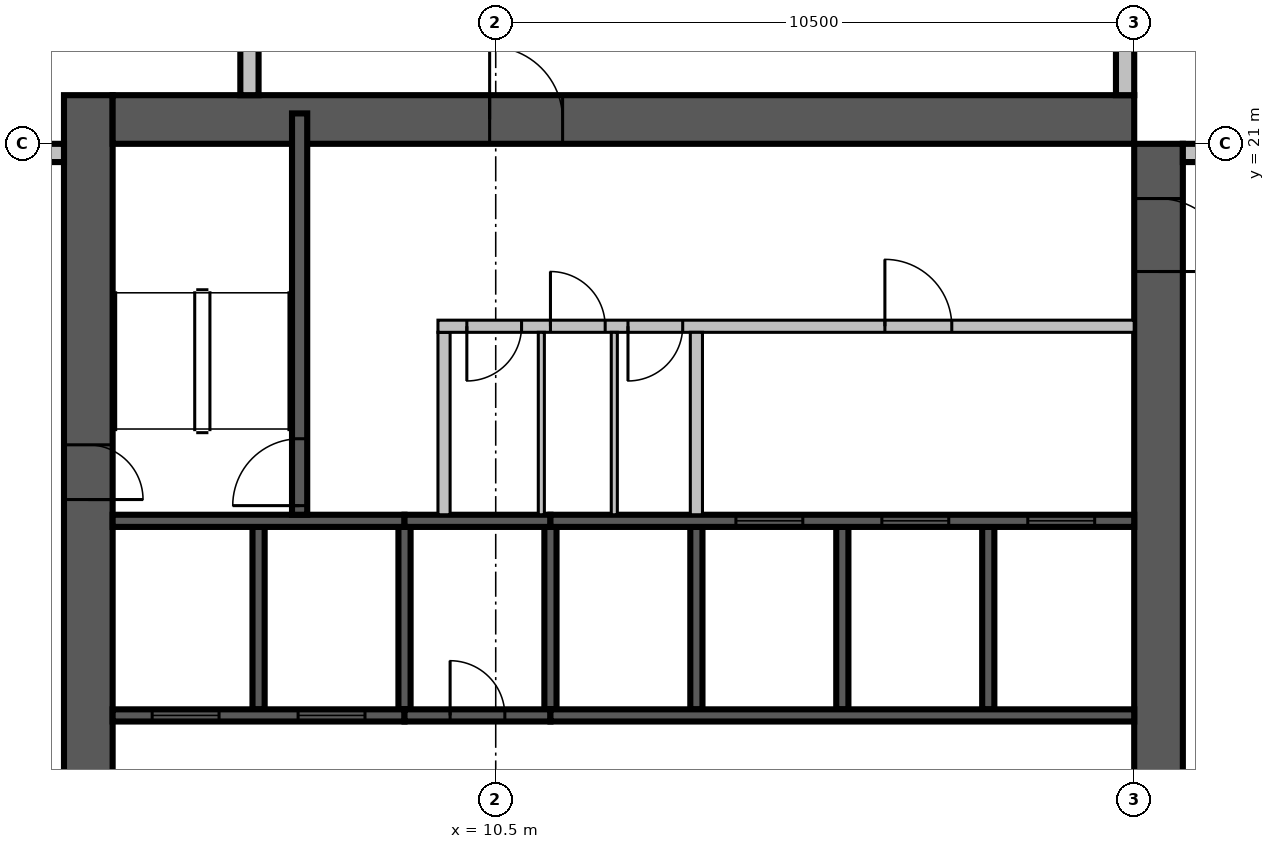
"""IFC4 building model, lengths in metres.
Left out: names, types, materials, properties, quantities, classifications, styles, units other than length and angle.
Written with IfcOpenShell. Run it as: python <this file> out.ifc"""

import sys

from ifc_helpers import new_model, si_unit, direction, frame, frame_2d, origin, place, context, subcontext, project, spatial, rectangle, extrude, source, transform, mapped, element, fill, save


model = new_model("IFC4")
c1 = context("Model", 3, precision=1e-05, world=origin(), true_north=direction((0.0, 1.0)))
c2 = subcontext(c1, "Body", "Model", "MODEL_VIEW")
j1 = project(units=[si_unit("LENGTHUNIT", "METRE"), si_unit("PLANEANGLEUNIT", "RADIAN")], contexts=[c1])
p1 = place(None, origin())
s1 = spatial("IfcSite", under=j1, at=p1, CompositionType="ELEMENT")
p2 = place(p1, origin())
s2 = spatial("IfcBuilding", under=s1, at=p2, CompositionType="ELEMENT")
p3 = place(p2, frame((0.0, 0.0, 196.8)))
s3 = spatial("IfcBuildingStorey", under=s2, at=p3, CompositionType="ELEMENT", Elevation=196.8)
m1 = source(origin(), c2, "Body", "SweptSolid", [
    extrude(rectangle(XDim=17.6, YDim=0.8, at=frame_2d((8.8, 0.0))), origin(), (0.0, 0.0, 1.0), 3.8),
])
p4 = place(p3, frame((3.8, 4.2, 0.0), z_axis=(0.0, 0.0, 1.0), x_axis=(0.0, 1.0, 0.0)))
e1 = element("IfcWall", 1, at=p4, inside=s3, PredefinedType="SHEAR", context=c2, shape_type="MappedRepresentation", body=[
    mapped(m1, transform((0.0, 0.0, 0.0), scale=1.0)),
])
m2 = source(origin(), c2, "Body", "SweptSolid", [
    extrude(rectangle(XDim=2.2, YDim=2.1, at=frame_2d((1.1, 1.05))), frame((0.0, 0.41, 0.0), z_axis=(0.0, -1.0, 0.0), x_axis=(1.0, 0.0, 0.0)), (0.0, 0.0, 1.0), 0.82),
])
p5 = place(p4, frame((4.2, 0.0, 0.0)))
e2 = element("IfcOpeningElement", 2, at=p5, cuts=e1, PredefinedType="OPENING", context=c2, shape_type="MappedRepresentation", body=[
    mapped(m2, transform((0.0, 0.0, 0.0), scale=1.0)),
])
m3 = source(origin(), c2, "Body", "SweptSolid", [
    extrude(rectangle(XDim=0.9, YDim=2.1, at=frame_2d((0.45, 1.05))), frame((0.0, 0.41, 0.0), z_axis=(0.0, -1.0, 0.0), x_axis=(1.0, 0.0, 0.0)), (0.0, 0.0, 1.0), 0.82),
])
p6 = place(p4, frame((10.95, 0.0, 0.0)))
e3 = element("IfcOpeningElement", 3, at=p6, cuts=e1, PredefinedType="OPENING", context=c2, shape_type="MappedRepresentation", body=[
    mapped(m3, transform((0.0, 0.0, 0.0), scale=1.0)),
])
m4 = source(origin(), c2, "Body", "SweptSolid", [
    extrude(rectangle(XDim=16.8, YDim=0.8, at=frame_2d((8.4, 0.0))), origin(), (0.0, 0.0, 1.0), 3.8),
])
p7 = place(p3, frame((21.4, 4.2, 0.0), z_axis=(0.0, 0.0, 1.0), x_axis=(0.0, 1.0, 0.0)))
e4 = element("IfcWall", 4, at=p7, inside=s3, PredefinedType="SHEAR", context=c2, shape_type="MappedRepresentation", body=[
    mapped(m4, transform((0.0, 0.0, 0.0), scale=1.0)),
])
p8 = place(p7, frame((4.2, 0.0, 0.0)))
e5 = element("IfcOpeningElement", 5, at=p8, cuts=e4, PredefinedType="OPENING", context=c2, shape_type="MappedRepresentation", body=[
    mapped(m2, transform((0.0, 0.0, 0.0), scale=1.0)),
])
m5 = source(origin(), c2, "Body", "SweptSolid", [
    extrude(rectangle(XDim=1.2, YDim=2.1, at=frame_2d((0.6, 1.05))), frame((0.0, 0.41, 0.0), z_axis=(0.0, -1.0, 0.0), x_axis=(1.0, 0.0, 0.0)), (0.0, 0.0, 1.0), 0.82),
])
p9 = place(p7, frame((14.7, 0.0, 0.0)))
e6 = element("IfcOpeningElement", 6, at=p9, cuts=e4, PredefinedType="OPENING", context=c2, shape_type="MappedRepresentation", body=[
    mapped(m5, transform((0.0, 0.0, 0.0), scale=1.0)),
])
p10 = place(p3, frame((4.2, 21.4, 0.0), z_axis=(0.0, 0.0, 1.0), x_axis=(1.0, 0.0, 0.0)))
e7 = element("IfcWall", 7, at=p10, inside=s3, PredefinedType="SHEAR", context=c2, shape_type="MappedRepresentation", body=[
    mapped(m4, transform((0.0, 0.0, 0.0), scale=1.0)),
])
p11 = place(p10, frame((6.2, 0.0, 0.0)))
e8 = element("IfcOpeningElement", 8, at=p11, cuts=e7, PredefinedType="OPENING", context=c2, shape_type="MappedRepresentation", body=[
    mapped(m5, transform((0.0, 0.0, 0.0), scale=1.0)),
])
m6 = source(origin(), c2, "Body", "SweptSolid", [
    extrude(rectangle(XDim=7.15, YDim=0.3, at=frame_2d((3.575, 0.0))), origin(), (0.0, 0.0, 1.0), 3.4),
])
p12 = place(p3, frame((28.95, 20.85, 0.0), z_axis=(0.0, 0.0, 1.0), x_axis=(-1.0, 0.0, 0.0)))
e9 = element("IfcWall", 9, at=p12, inside=s3, PredefinedType="STANDARD", context=c2, shape_type="MappedRepresentation", body=[
    mapped(m6, transform((0.0, 0.0, 0.0), scale=1.0)),
])
m7 = source(origin(), c2, "Body", "SweptSolid", [
    extrude(rectangle(XDim=3.0, YDim=2.3, at=frame_2d((1.5, 1.15))), frame((0.0, 0.16, 0.0), z_axis=(0.0, -1.0, 0.0), x_axis=(1.0, 0.0, 0.0)), (0.0, 0.0, 1.0), 0.32),
])
p13 = place(p12, frame((0.15, 0.0, 0.6)))
e10 = element("IfcOpeningElement", 10, at=p13, cuts=e9, PredefinedType="OPENING", context=c2, shape_type="MappedRepresentation", body=[
    mapped(m7, transform((0.0, 0.0, 0.0), scale=1.0)),
])
p14 = place(p3, frame((20.85, 21.8, 0.0), z_axis=(0.0, 0.0, 1.0), x_axis=(0.0, 1.0, 0.0)))
e11 = element("IfcWall", 11, at=p14, inside=s3, PredefinedType="STANDARD", context=c2, shape_type="MappedRepresentation", body=[
    mapped(m6, transform((0.0, 0.0, 0.0), scale=1.0)),
])
p15 = place(p14, frame((4.0, 0.0, 0.6)))
e12 = element("IfcOpeningElement", 12, at=p15, cuts=e11, PredefinedType="OPENING", context=c2, shape_type="MappedRepresentation", body=[
    mapped(m7, transform((0.0, 0.0, 0.0), scale=1.0)),
])
m8 = source(origin(), c2, "Body", "SweptSolid", [
    extrude(rectangle(XDim=16.6, YDim=0.3, at=frame_2d((8.3, 0.0))), origin(), (0.0, 0.0, 1.0), 3.4),
])
p16 = place(p3, frame((6.45, 38.4, 0.0), z_axis=(0.0, 0.0, 1.0), x_axis=(0.0, -1.0, 0.0)))
e13 = element("IfcWall", 13, at=p16, inside=s3, PredefinedType="STANDARD", context=c2, shape_type="MappedRepresentation", body=[
    mapped(m8, transform((0.0, 0.0, 0.0), scale=1.0)),
])
m9 = source(origin(), c2, "Body", "SweptSolid", [
    extrude(rectangle(XDim=1.8, YDim=2.3, at=frame_2d((0.9, 1.15))), frame((0.0, 0.16, 0.0), z_axis=(0.0, -1.0, 0.0), x_axis=(1.0, 0.0, 0.0)), (0.0, 0.0, 1.0), 0.32),
])
p17 = place(p16, frame((1.15, 0.0, 0.6)))
e14 = element("IfcOpeningElement", 14, at=p17, cuts=e13, PredefinedType="OPENING", context=c2, shape_type="MappedRepresentation", body=[
    mapped(m9, transform((0.0, 0.0, 0.0), scale=1.0)),
])
p18 = place(p16, frame((9.438, 0.0, 0.6)))
e15 = element("IfcOpeningElement", 15, at=p18, cuts=e13, PredefinedType="OPENING", context=c2, shape_type="MappedRepresentation", body=[
    mapped(m9, transform((0.0, 0.0, 0.0), scale=1.0)),
])
m10 = source(origin(), c2, "Body", "SweptSolid", [
    extrude(rectangle(XDim=1.2, YDim=2.3, at=frame_2d((0.6, 1.15))), frame((0.0, 0.16, 0.0), z_axis=(0.0, -1.0, 0.0), x_axis=(1.0, 0.0, 0.0)), (0.0, 0.0, 1.0), 0.32),
])
p19 = place(p16, frame((13.012, 0.0, 0.6)))
e16 = element("IfcOpeningElement", 16, at=p19, cuts=e13, PredefinedType="OPENING", context=c2, shape_type="MappedRepresentation", body=[
    mapped(m10, transform((0.0, 0.0, 0.0), scale=1.0)),
])
m11 = source(origin(), c2, "Body", "SweptSolid", [
    extrude(rectangle(XDim=1.0, YDim=2.1, at=frame_2d((0.5, 1.05))), frame((0.0, 0.16, 0.0), z_axis=(0.0, -1.0, 0.0), x_axis=(1.0, 0.0, 0.0)), (0.0, 0.0, 1.0), 0.32),
])
p20 = place(p16, frame((5.45, 0.0, 0.0)))
e17 = element("IfcOpeningElement", 17, at=p20, cuts=e13, PredefinedType="OPENING", context=c2, shape_type="MappedRepresentation", body=[
    mapped(m11, transform((0.0, 0.0, 0.0), scale=1.0)),
])
m12 = source(origin(), c2, "Body", "SweptSolid", [
    extrude(rectangle(XDim=2.5, YDim=0.3, at=frame_2d((1.25, 0.0))), origin(), (0.0, 0.0, 1.0), 3.4),
])
p21 = place(p3, frame((3.4, 20.85, 0.0), z_axis=(0.0, 0.0, 1.0), x_axis=(-1.0, 0.0, 0.0)))
e18 = element("IfcWall", 18, at=p21, inside=s3, PredefinedType="STANDARD", context=c2, shape_type="MappedRepresentation", body=[
    mapped(m12, transform((0.0, 0.0, 0.0), scale=1.0)),
])
p22 = place(p21, frame((0.4, 0.0, 0.6)))
e19 = element("IfcOpeningElement", 19, at=p22, cuts=e18, PredefinedType="OPENING", context=c2, shape_type="MappedRepresentation", body=[
    mapped(m9, transform((0.0, 0.0, 0.0), scale=1.0)),
])
m13 = source(origin(), c2, "Body", "SweptSolid", [
    extrude(rectangle(XDim=3.0, YDim=0.2, at=frame_2d((1.5, 0.0))), origin(), (0.0, 0.0, 1.0), 3.8),
])
p23 = place(p3, frame((6.6, 11.7, 0.0), z_axis=(0.0, 0.0, 1.0), x_axis=(0.0, 1.0, 0.0)))
e20 = element("IfcWall", 20, at=p23, inside=s3, PredefinedType="SOLIDWALL", context=c2, shape_type="MappedRepresentation", body=[
    mapped(m13, transform((0.0, 0.0, 0.0), scale=1.0)),
])
m14 = source(origin(), c2, "Body", "SweptSolid", [
    extrude(rectangle(XDim=3.0, YDim=0.2, at=frame_2d((1.5, 0.0))), origin(), (0.0, 0.0, 1.0), 3.4),
])
for number, where, z_axis, x_axis in (
    (21, (9.0, 11.7, 0.0), (0.0, 0.0, 1.0), (0.0, 1.0, 0.0)),
    (22, (11.4, 11.7, 0.0), (0.0, 0.0, 1.0), (0.0, 1.0, 0.0)),
):
    element("IfcWall", number, at=place(p3, frame(where, z_axis=z_axis, x_axis=x_axis)), inside=s3, PredefinedType="SOLIDWALL", context=c2, shape_type="MappedRepresentation", body=[
        mapped(m14, transform((0.0, 0.0, 0.0), scale=1.0)),
    ])
for number, where, z_axis, x_axis in (
    (23, (13.8, 11.7, 0.0), (0.0, 0.0, 1.0), (0.0, 1.0, 0.0)),
    (24, (16.2, 11.7, 0.0), (0.0, 0.0, 1.0), (0.0, 1.0, 0.0)),
    (25, (18.6, 11.7, 0.0), (0.0, 0.0, 1.0), (0.0, 1.0, 0.0)),
):
    element("IfcWall", number, at=place(p3, frame(where, z_axis=z_axis, x_axis=x_axis)), inside=s3, PredefinedType="SOLIDWALL", context=c2, shape_type="MappedRepresentation", body=[
        mapped(m13, transform((0.0, 0.0, 0.0), scale=1.0)),
    ])
m15 = source(origin(), c2, "Body", "SweptSolid", [
    extrude(rectangle(XDim=4.8, YDim=0.2, at=frame_2d((2.4, 0.0))), origin(), (0.0, 0.0, 1.0), 3.8),
])
p24 = place(p3, frame((4.2, 11.6, 0.0), z_axis=(0.0, 0.0, 1.0), x_axis=(1.0, 0.0, 0.0)))
e26 = element("IfcWall", 26, at=p24, inside=s3, PredefinedType="SOLIDWALL", context=c2, shape_type="MappedRepresentation", body=[
    mapped(m15, transform((0.0, 0.0, 0.0), scale=1.0)),
])
m16 = source(origin(), c2, "Body", "SweptSolid", [
    extrude(rectangle(XDim=1.1, YDim=2.1, at=frame_2d((0.55, 1.05))), frame((0.0, 0.11, 0.0), z_axis=(0.0, -1.0, 0.0), x_axis=(1.0, 0.0, 0.0)), (0.0, 0.0, 1.0), 0.22),
])
p25 = place(p24, frame((0.65, 0.0, 0.0)))
e27 = element("IfcOpeningElement", 27, at=p25, cuts=e26, PredefinedType="OPENING", context=c2, shape_type="MappedRepresentation", body=[
    mapped(m16, transform((0.0, 0.0, 0.0), scale=1.0)),
])
p26 = place(p24, frame((3.05, 0.0, 0.0)))
e28 = element("IfcOpeningElement", 28, at=p26, cuts=e26, PredefinedType="OPENING", context=c2, shape_type="MappedRepresentation", body=[
    mapped(m16, transform((0.0, 0.0, 0.0), scale=1.0)),
])
m17 = source(origin(), c2, "Body", "SweptSolid", [
    extrude(rectangle(XDim=2.4, YDim=0.2, at=frame_2d((1.2, 0.0))), origin(), (0.0, 0.0, 1.0), 3.4),
])
p27 = place(p3, frame((9.0, 11.6, 0.0), z_axis=(0.0, 0.0, 1.0), x_axis=(1.0, 0.0, 0.0)))
e29 = element("IfcWall", 29, at=p27, inside=s3, PredefinedType="SOLIDWALL", context=c2, shape_type="MappedRepresentation", body=[
    mapped(m17, transform((0.0, 0.0, 0.0), scale=1.0)),
])
m18 = source(origin(), c2, "Body", "SweptSolid", [
    extrude(rectangle(XDim=0.9, YDim=2.1, at=frame_2d((0.45, 1.05))), frame((0.0, 0.11, 0.0), z_axis=(0.0, -1.0, 0.0), x_axis=(1.0, 0.0, 0.0)), (0.0, 0.0, 1.0), 0.22),
])
p28 = place(p27, frame((0.75, 0.0, 0.0)))
e30 = element("IfcOpeningElement", 30, at=p28, cuts=e29, PredefinedType="OPENING", context=c2, shape_type="MappedRepresentation", body=[
    mapped(m18, transform((0.0, 0.0, 0.0), scale=1.0)),
])
m19 = source(origin(), c2, "Body", "SweptSolid", [
    extrude(rectangle(XDim=9.6, YDim=0.2, at=frame_2d((4.8, 0.0))), origin(), (0.0, 0.0, 1.0), 3.8),
])
p29 = place(p3, frame((11.4, 11.6, 0.0), z_axis=(0.0, 0.0, 1.0), x_axis=(1.0, 0.0, 0.0)))
e31 = element("IfcWall", 31, at=p29, inside=s3, PredefinedType="SOLIDWALL", context=c2, shape_type="MappedRepresentation", body=[
    mapped(m19, transform((0.0, 0.0, 0.0), scale=1.0)),
])
p30 = place(p3, frame((4.2, 14.8, 0.0), z_axis=(0.0, 0.0, 1.0), x_axis=(1.0, 0.0, 0.0)))
e32 = element("IfcWall", 32, at=p30, inside=s3, PredefinedType="SOLIDWALL", context=c2, shape_type="MappedRepresentation", body=[
    mapped(m15, transform((0.0, 0.0, 0.0), scale=1.0)),
])
p31 = place(p3, frame((9.0, 14.8, 0.0), z_axis=(0.0, 0.0, 1.0), x_axis=(1.0, 0.0, 0.0)))
e33 = element("IfcWall", 33, at=p31, inside=s3, PredefinedType="SOLIDWALL", context=c2, shape_type="MappedRepresentation", body=[
    mapped(m17, transform((0.0, 0.0, 0.0), scale=1.0)),
])
p32 = place(p3, frame((11.4, 14.8, 0.0), z_axis=(0.0, 0.0, 1.0), x_axis=(1.0, 0.0, 0.0)))
e34 = element("IfcWall", 34, at=p32, inside=s3, PredefinedType="SOLIDWALL", context=c2, shape_type="MappedRepresentation", body=[
    mapped(m19, transform((0.0, 0.0, 0.0), scale=1.0)),
])
p33 = place(p32, frame((3.05, 0.0, 0.0)))
e35 = element("IfcOpeningElement", 35, at=p33, cuts=e34, PredefinedType="OPENING", context=c2, shape_type="MappedRepresentation", body=[
    mapped(m16, transform((0.0, 0.0, 0.0), scale=1.0)),
])
p34 = place(p32, frame((5.45, 0.0, 0.0)))
e36 = element("IfcOpeningElement", 36, at=p34, cuts=e34, PredefinedType="OPENING", context=c2, shape_type="MappedRepresentation", body=[
    mapped(m16, transform((0.0, 0.0, 0.0), scale=1.0)),
])
p35 = place(p32, frame((7.85, 0.0, 0.0)))
e37 = element("IfcOpeningElement", 37, at=p35, cuts=e34, PredefinedType="OPENING", context=c2, shape_type="MappedRepresentation", body=[
    mapped(m16, transform((0.0, 0.0, 0.0), scale=1.0)),
])
m20 = source(origin(), c2, "Body", "SweptSolid", [
    extrude(rectangle(XDim=6.6, YDim=0.25, at=frame_2d((3.3, 0.0))), origin(), (0.0, 0.0, 1.0), 3.4),
])
p36 = place(p3, frame((7.275, 14.9, 0.0), z_axis=(0.0, 0.0, 1.0), x_axis=(0.0, 1.0, 0.0)))
e38 = element("IfcWall", 38, at=p36, inside=s3, PredefinedType="SOLIDWALL", context=c2, shape_type="MappedRepresentation", body=[
    mapped(m20, transform((0.0, 0.0, 0.0), scale=1.0)),
])
m21 = source(origin(), c2, "Body", "SweptSolid", [
    extrude(rectangle(XDim=1.1, YDim=2.1, at=frame_2d((0.55, 1.05))), frame((0.0, 0.135, 0.0), z_axis=(0.0, -1.0, 0.0), x_axis=(1.0, 0.0, 0.0)), (0.0, 0.0, 1.0), 0.27),
])
p37 = place(p36, frame((0.15, 0.0, 0.0)))
e39 = element("IfcOpeningElement", 39, at=p37, cuts=e38, PredefinedType="OPENING", context=c2, shape_type="MappedRepresentation", body=[
    mapped(m21, transform((0.0, 0.0, 0.0), scale=1.0)),
])
m22 = source(origin(), c2, "Body", "SweptSolid", [
    extrude(rectangle(XDim=3.0, YDim=0.2, at=frame_2d((1.5, 0.0))), origin(), (0.0, 0.0, 1.0), 3.4),
])
p38 = place(p3, frame((9.65, 14.9, 0.0), z_axis=(0.0, 0.0, 1.0), x_axis=(0.0, 1.0, 0.0)))
e40 = element("IfcWall", 40, at=p38, inside=s3, PredefinedType="PARTITIONING", context=c2, shape_type="MappedRepresentation", body=[
    mapped(m22, transform((0.0, 0.0, 0.0), scale=1.0)),
])
m23 = source(origin(), c2, "Body", "SweptSolid", [
    extrude(rectangle(XDim=11.45, YDim=0.2, at=frame_2d((5.725, 0.0))), origin(), (0.0, 0.0, 1.0), 3.4),
])
p39 = place(p3, frame((9.55, 18.0, 0.0), z_axis=(0.0, 0.0, 1.0), x_axis=(1.0, 0.0, 0.0)))
e41 = element("IfcWall", 41, at=p39, inside=s3, PredefinedType="PARTITIONING", context=c2, shape_type="MappedRepresentation", body=[
    mapped(m23, transform((0.0, 0.0, 0.0), scale=1.0)),
])
p40 = place(p39, frame((0.475, 0.0, 0.0)))
e42 = element("IfcOpeningElement", 42, at=p40, cuts=e41, PredefinedType="OPENING", context=c2, shape_type="MappedRepresentation", body=[
    mapped(m18, transform((0.0, 0.0, 0.0), scale=1.0)),
])
p41 = place(p39, frame((1.85, 0.0, 0.0)))
e43 = element("IfcOpeningElement", 43, at=p41, cuts=e41, PredefinedType="OPENING", context=c2, shape_type="MappedRepresentation", body=[
    mapped(m18, transform((0.0, 0.0, 0.0), scale=1.0)),
])
p42 = place(p39, frame((3.125, 0.0, 0.0)))
e44 = element("IfcOpeningElement", 44, at=p42, cuts=e41, PredefinedType="OPENING", context=c2, shape_type="MappedRepresentation", body=[
    mapped(m18, transform((0.0, 0.0, 0.0), scale=1.0)),
])
p43 = place(p39, frame((7.35, 0.0, 0.0)))
e45 = element("IfcOpeningElement", 45, at=p43, cuts=e41, PredefinedType="OPENING", context=c2, shape_type="MappedRepresentation", body=[
    mapped(m16, transform((0.0, 0.0, 0.0), scale=1.0)),
])
p44 = place(p3, frame((13.8, 14.9, 0.0), z_axis=(0.0, 0.0, 1.0), x_axis=(0.0, 1.0, 0.0)))
e46 = element("IfcWall", 46, at=p44, inside=s3, PredefinedType="PARTITIONING", context=c2, shape_type="MappedRepresentation", body=[
    mapped(m22, transform((0.0, 0.0, 0.0), scale=1.0)),
])
m24 = source(origin(), c2, "Body", "SweptSolid", [
    extrude(rectangle(XDim=3.0, YDim=0.1, at=frame_2d((1.5, 0.0))), origin(), (0.0, 0.0, 1.0), 3.4),
])
for number, where, z_axis, x_axis in (
    (47, (11.25, 14.9, 0.0), (0.0, 0.0, 1.0), (0.0, 1.0, 0.0)),
    (48, (12.45, 14.9, 0.0), (0.0, 0.0, 1.0), (0.0, 1.0, 0.0)),
):
    element("IfcWall", number, at=place(p3, frame(where, z_axis=z_axis, x_axis=x_axis)), inside=s3, PredefinedType="PARTITIONING", context=c2, shape_type="MappedRepresentation", body=[
        mapped(m24, transform((0.0, 0.0, 0.0), scale=1.0)),
    ])
m25 = source(origin(), c2, "Body", "SweptSolid", [
    extrude(rectangle(XDim=1.1, YDim=2.1, at=frame_2d((0.55, 1.05))), frame((0.0, 0.025, 0.0), z_axis=(0.0, -1.0, 0.0), x_axis=(1.0, 0.0, 0.0)), (0.0, 0.0, 1.0), 0.05),
])
p45 = place(p25, origin())
e49 = element("IfcDoor", 49, at=p45, inside=s3, OperationType="SLIDING_TO_LEFT", PredefinedType="DOOR", context=c2, shape_type="MappedRepresentation", body=[
    mapped(m25, transform((0.0, 0.0, 0.0), scale=1.0)),
])
fill(e27, e49)
p46 = place(p26, origin())
e50 = element("IfcDoor", 50, at=p46, inside=s3, OperationType="SLIDING_TO_LEFT", PredefinedType="DOOR", context=c2, shape_type="MappedRepresentation", body=[
    mapped(m25, transform((0.0, 0.0, 0.0), scale=1.0)),
])
fill(e28, e50)
m26 = source(origin(), c2, "Body", "SweptSolid", [
    extrude(rectangle(XDim=0.9, YDim=2.1, at=frame_2d((0.45, 1.05))), frame((0.0, 0.025, 0.0), z_axis=(0.0, -1.0, 0.0), x_axis=(1.0, 0.0, 0.0)), (0.0, 0.0, 1.0), 0.05),
])
p47 = place(p28, origin())
e51 = element("IfcDoor", 51, at=p47, inside=s3, OperationType="SINGLE_SWING_LEFT", PredefinedType="DOOR", context=c2, shape_type="MappedRepresentation", body=[
    mapped(m26, transform((0.0, 0.0, 0.0), scale=1.0)),
])
fill(e30, e51)
p48 = place(p33, origin())
e52 = element("IfcDoor", 52, at=p48, inside=s3, OperationType="SLIDING_TO_LEFT", PredefinedType="DOOR", context=c2, shape_type="MappedRepresentation", body=[
    mapped(m25, transform((0.0, 0.0, 0.0), scale=1.0)),
])
fill(e35, e52)
p49 = place(p34, origin())
e53 = element("IfcDoor", 53, at=p49, inside=s3, OperationType="SLIDING_TO_LEFT", PredefinedType="DOOR", context=c2, shape_type="MappedRepresentation", body=[
    mapped(m25, transform((0.0, 0.0, 0.0), scale=1.0)),
])
fill(e36, e53)
p50 = place(p35, origin())
e54 = element("IfcDoor", 54, at=p50, inside=s3, OperationType="SLIDING_TO_LEFT", PredefinedType="DOOR", context=c2, shape_type="MappedRepresentation", body=[
    mapped(m25, transform((0.0, 0.0, 0.0), scale=1.0)),
])
fill(e37, e54)
p51 = place(p37, origin())
e55 = element("IfcDoor", 55, at=p51, inside=s3, OperationType="SINGLE_SWING_LEFT", PredefinedType="DOOR", context=c2, shape_type="MappedRepresentation", body=[
    mapped(m25, transform((0.0, 0.0, 0.0), scale=1.0)),
])
fill(e39, e55)
p52 = place(p40, origin())
e56 = element("IfcDoor", 56, at=p52, inside=s3, OperationType="SINGLE_SWING_RIGHT", PredefinedType="DOOR", context=c2, shape_type="MappedRepresentation", body=[
    mapped(m26, transform((0.0, 0.0, 0.0), scale=1.0)),
])
fill(e42, e56)
p53 = place(p41, origin())
e57 = element("IfcDoor", 57, at=p53, inside=s3, OperationType="SINGLE_SWING_LEFT", PredefinedType="DOOR", context=c2, shape_type="MappedRepresentation", body=[
    mapped(m26, transform((0.0, 0.0, 0.0), scale=1.0)),
])
fill(e43, e57)
p54 = place(p42, origin())
e58 = element("IfcDoor", 58, at=p54, inside=s3, OperationType="SINGLE_SWING_RIGHT", PredefinedType="DOOR", context=c2, shape_type="MappedRepresentation", body=[
    mapped(m26, transform((0.0, 0.0, 0.0), scale=1.0)),
])
fill(e44, e58)
p55 = place(p43, origin())
e59 = element("IfcDoor", 59, at=p55, inside=s3, OperationType="SINGLE_SWING_LEFT", PredefinedType="DOOR", context=c2, shape_type="MappedRepresentation", body=[
    mapped(m25, transform((0.0, 0.0, 0.0), scale=1.0)),
])
fill(e45, e59)
m27 = source(origin(), c2, "Body", "SweptSolid", [
    extrude(rectangle(XDim=1.2, YDim=2.1, at=frame_2d((0.6, 1.05))), frame((0.0, 0.025, 0.0), z_axis=(0.0, -1.0, 0.0), x_axis=(1.0, 0.0, 0.0)), (0.0, 0.0, 1.0), 0.05),
])
p56 = place(p11, origin())
e60 = element("IfcDoor", 60, at=p56, inside=s3, OperationType="SINGLE_SWING_LEFT", PredefinedType="DOOR", context=c2, shape_type="MappedRepresentation", body=[
    mapped(m27, transform((0.0, 0.0, 0.0), scale=1.0)),
])
fill(e8, e60)
p57 = place(p9, origin())
e61 = element("IfcDoor", 61, at=p57, inside=s3, OperationType="SINGLE_SWING_RIGHT", PredefinedType="DOOR", context=c2, shape_type="MappedRepresentation", body=[
    mapped(m27, transform((0.0, 0.0, 0.0), scale=1.0)),
])
fill(e6, e61)
p58 = place(p6, origin())
e62 = element("IfcDoor", 62, at=p58, inside=s3, OperationType="SINGLE_SWING_RIGHT", PredefinedType="DOOR", context=c2, shape_type="MappedRepresentation", body=[
    mapped(m26, transform((0.0, 0.0, 0.0), scale=1.0)),
])
fill(e3, e62)
save(model, sys.argv[1])
